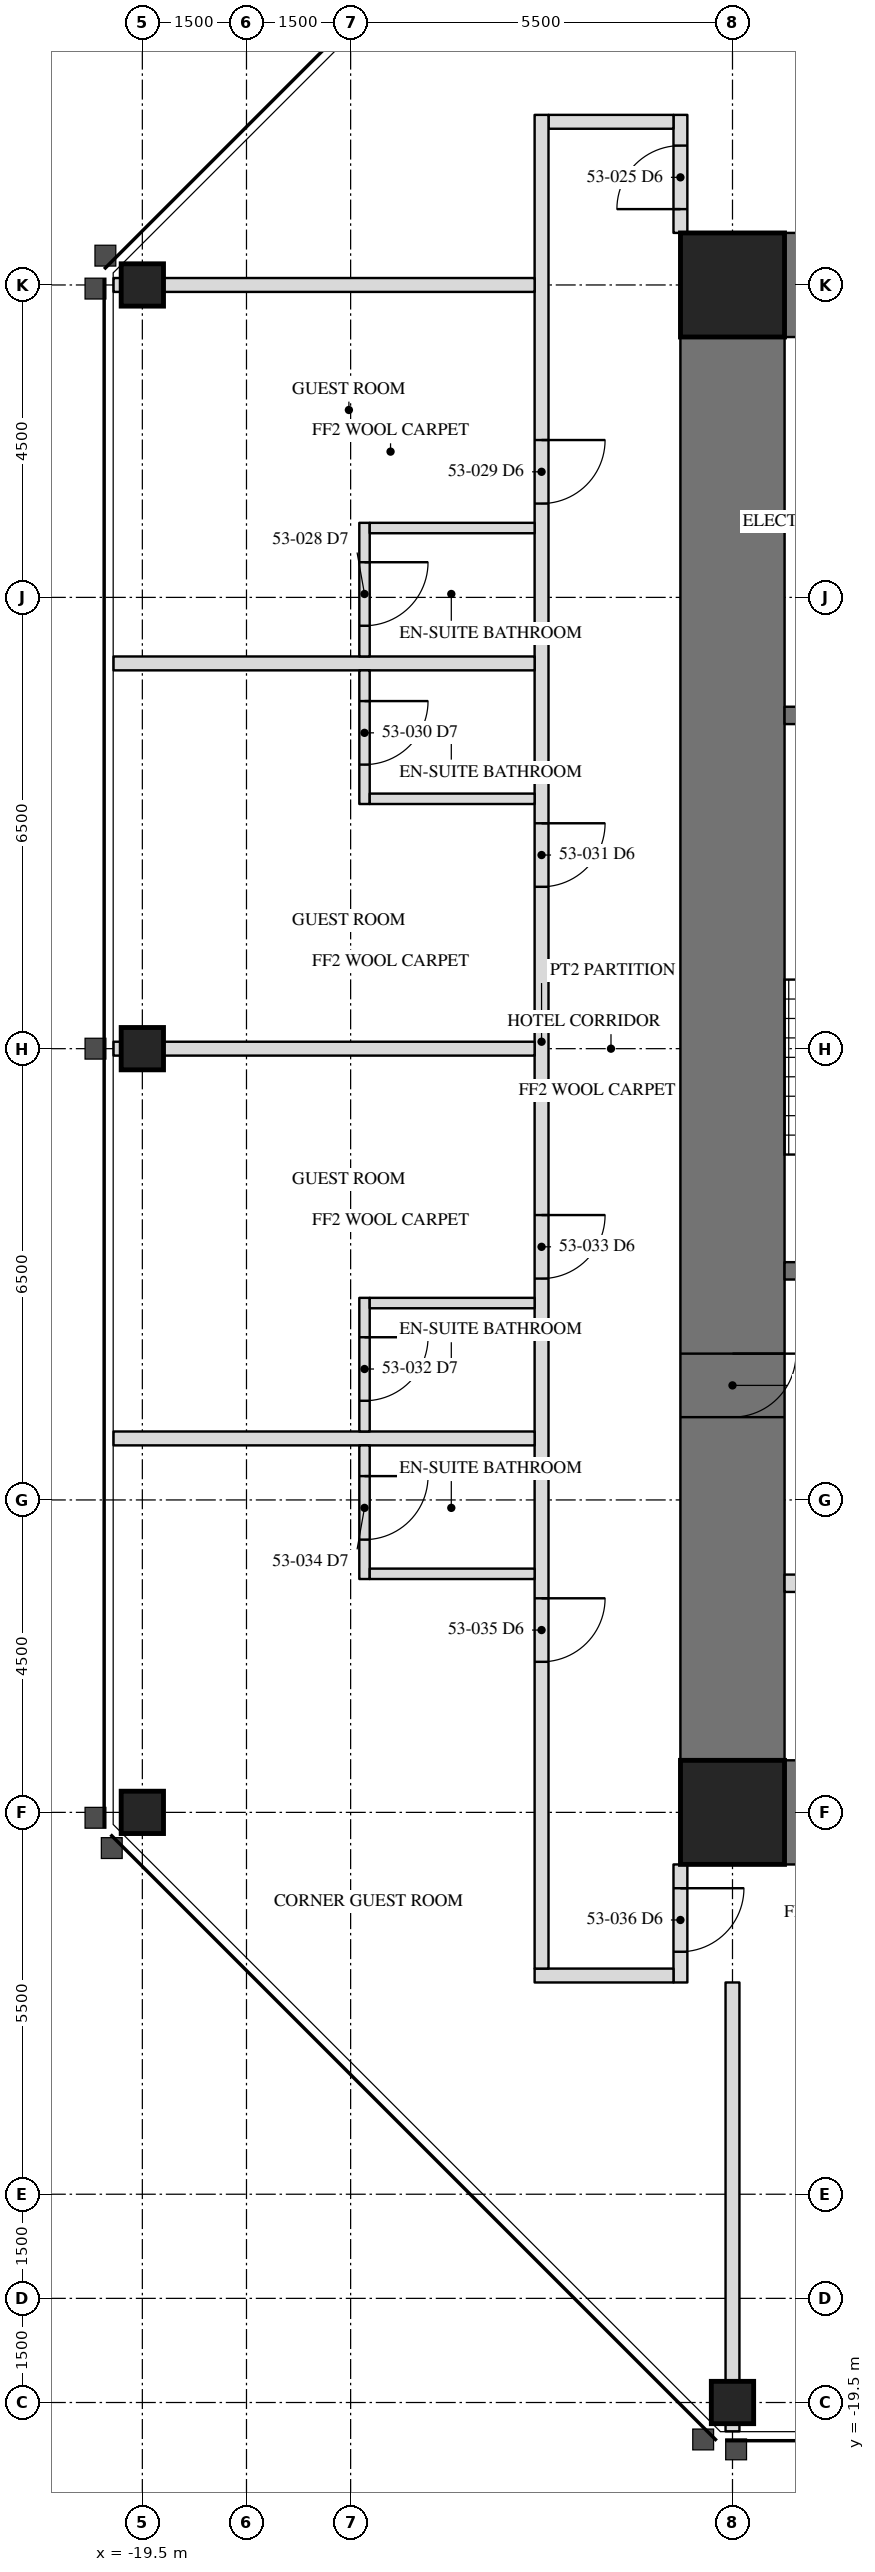
"""IFC4 building model, lengths in metres.
Left out: names, types, materials, properties, quantities, classifications, styles, units other than length and angle.
Written with IfcOpenShell. Run it as: python <this file> out.ifc"""

import sys

from ifc_helpers import new_model, si_unit, direction, frame, frame_2d, origin, origin_2d, place, context, subcontext, project, spatial, rectangle, hollow_rectangle, extrude, element, fill, save


model = new_model("IFC4")
c1 = context("Model", 3, precision=1e-05, world=origin(), true_north=direction((0.0, 1.0)))
c2 = subcontext(c1, "Body", "Model", "MODEL_VIEW")
j1 = project(units=[si_unit("LENGTHUNIT", "METRE"), si_unit("PLANEANGLEUNIT", "RADIAN")], contexts=[c1])
p1 = place(None, origin())
s1 = spatial("IfcSite", under=j1, at=p1, CompositionType="ELEMENT")
p2 = place(p1, origin())
s2 = spatial("IfcBuilding", under=s1, at=p2, CompositionType="ELEMENT")
p3 = place(p2, frame((0.0, 0.0, 222.2)))
s3 = spatial("IfcBuildingStorey", under=s2, at=p3, CompositionType="ELEMENT", Elevation=222.2)
for number, where, z_axis, x_axis in (
    (1, (-19.5, 0.0, 0.0), (0.0, 0.0, 1.0), (0.0, 1.0, 0.0)),
    (2, (-19.5, -11.0, 0.0), (0.0, 0.0, 1.0), (0.0, 1.0, 0.0)),
    (3, (-11.0, -19.5, 0.0), (0.0, 0.0, 1.0), (1.0, 0.0, 0.0)),
    (4, (-19.5, 11.0, 0.0), (0.0, 0.0, 1.0), (0.0, 1.0, 0.0)),
):
    element("IfcColumn", number, at=place(p3, frame(where, z_axis=z_axis, x_axis=x_axis)), inside=s3, PredefinedType="COLUMN", context=c2, shape_type="SweptSolid", body=[
        extrude(hollow_rectangle(XDim=0.61, YDim=0.61, WallThickness=0.076, at=origin_2d()), origin(), (0.0, 0.0, 1.0), 3.5),
    ])
p4 = place(p3, frame((-11.0, 11.0, 0.0), z_axis=(0.0, 0.0, 1.0), x_axis=(0.0, -1.0, 0.0)))
e5 = element("IfcWall", 5, at=p4, inside=s3, PredefinedType="SHEAR", context=c2, shape_type="SweptSolid", body=[
    extrude(rectangle(XDim=22.0, YDim=1.5, at=frame_2d((11.0, 0.0))), origin(), (0.0, 0.0, 1.0), 3.5),
])
p5 = place(p4, frame((15.393, 0.0, 0.0)))
e6 = element("IfcOpeningElement", 6, at=p5, cuts=e5, PredefinedType="OPENING", context=c2, shape_type="SweptSolid", body=[
    extrude(rectangle(XDim=0.915, YDim=2.134, at=frame_2d((0.458, 1.067))), frame((0.0, 0.76, 0.0), z_axis=(0.0, -1.0, 0.0), x_axis=(1.0, 0.0, 0.0)), (0.0, 0.0, 1.0), 1.52),
])
for number, where, z_axis, x_axis in (
    (7, (-6.5, 11.0, 0.0), (0.0, 0.0, 1.0), (-1.0, 0.0, 0.0)),
    (8, (-11.0, -11.0, 0.0), (0.0, 0.0, 1.0), (1.0, 0.0, 0.0)),
):
    element("IfcWall", number, at=place(p3, frame(where, z_axis=z_axis, x_axis=x_axis)), inside=s3, PredefinedType="SHEAR", context=c2, shape_type="SweptSolid", body=[
        extrude(rectangle(XDim=4.5, YDim=1.5, at=frame_2d((2.25, 0.0))), origin(), (0.0, 0.0, 1.0), 3.5),
    ])
for number, where, z_axis, x_axis in (
    (9, (-11.0, 11.0, 0.0), (0.0, 0.0, 1.0), (1.0, 0.0, 0.0)),
    (10, (-11.0, -11.0, 0.0), (0.0, 0.0, 1.0), (1.0, 0.0, 0.0)),
):
    element("IfcColumn", number, at=place(p3, frame(where, z_axis=z_axis, x_axis=x_axis)), inside=s3, PredefinedType="COLUMN", context=c2, shape_type="SweptSolid", body=[
        extrude(hollow_rectangle(XDim=1.499, YDim=1.499, WallThickness=0.102, at=origin_2d()), origin(), (0.0, 0.0, 1.0), 3.5),
    ])
p6 = place(p3, frame((-6.95, 4.8, 0.0), z_axis=(0.0, 0.0, 1.0), x_axis=(-1.0, 0.0, 0.0)))
e11 = element("IfcWall", 11, at=p6, inside=s3, PredefinedType="SOLIDWALL", context=c2, shape_type="SweptSolid", body=[
    extrude(rectangle(XDim=3.3, YDim=0.25, at=frame_2d((1.65, 0.0))), origin(), (0.0, 0.0, 1.0), 3.31),
])
p7 = place(p3, frame((-6.95, -3.2, 0.0), z_axis=(0.0, 0.0, 1.0), x_axis=(-1.0, 0.0, 0.0)))
e12 = element("IfcWall", 12, at=p7, inside=s3, PredefinedType="SOLIDWALL", context=c2, shape_type="SweptSolid", body=[
    extrude(rectangle(XDim=3.3, YDim=0.25, at=frame_2d((1.65, 0.0))), origin(), (0.0, 0.0, 1.0), 3.31),
])
p8 = place(p7, frame((1.116, 0.0, 0.0)))
e13 = element("IfcOpeningElement", 13, at=p8, cuts=e12, PredefinedType="OPENING", context=c2, shape_type="SweptSolid", body=[
    extrude(rectangle(XDim=1.067, YDim=2.134, at=frame_2d((0.533, 1.067))), frame((0.0, 0.135, 0.0), z_axis=(0.0, -1.0, 0.0), x_axis=(1.0, 0.0, 0.0)), (0.0, 0.0, 1.0), 0.27),
])
p9 = place(p3, frame((-6.95, -7.7, 0.0), z_axis=(0.0, 0.0, 1.0), x_axis=(-1.0, 0.0, 0.0)))
e14 = element("IfcWall", 14, at=p9, inside=s3, PredefinedType="PARTITIONING", context=c2, shape_type="SweptSolid", body=[
    extrude(rectangle(XDim=3.3, YDim=0.25, at=frame_2d((1.65, 0.0))), origin(), (0.0, 0.0, 1.0), 3.31),
])
p10 = place(p9, frame((0.45, 0.0, 0.0)))
e15 = element("IfcOpeningElement", 15, at=p10, cuts=e14, PredefinedType="OPENING", context=c2, shape_type="SweptSolid", body=[
    extrude(rectangle(XDim=1.219, YDim=2.134, at=frame_2d((0.609, 1.067))), frame((0.0, 0.135, 0.0), z_axis=(0.0, -1.0, 0.0), x_axis=(1.0, 0.0, 0.0)), (0.0, 0.0, 1.0), 0.27),
])
p11 = place(p3, frame((-11.75, 11.75, 0.0), z_axis=(0.0, 0.0, 1.0), x_axis=(0.0, 1.0, 0.0)))
e16 = element("IfcWall", 16, at=p11, inside=s3, PredefinedType="PARTITIONING", context=c2, shape_type="SweptSolid", body=[
    extrude(rectangle(XDim=1.7, YDim=0.2, at=frame_2d((0.85, 0.0))), origin(), (0.0, 0.0, 1.0), 3.31),
])
p12 = place(p11, frame((0.343, 0.0, 0.0)))
e17 = element("IfcOpeningElement", 17, at=p12, cuts=e16, PredefinedType="OPENING", context=c2, shape_type="SweptSolid", body=[
    extrude(rectangle(XDim=0.915, YDim=2.134, at=frame_2d((0.458, 1.067))), frame((0.0, 0.11, 0.0), z_axis=(0.0, -1.0, 0.0), x_axis=(1.0, 0.0, 0.0)), (0.0, 0.0, 1.0), 0.22),
])
p13 = place(p3, frame((-11.85, 13.35, 0.0), z_axis=(0.0, 0.0, 1.0), x_axis=(-1.0, 0.0, 0.0)))
e18 = element("IfcWall", 18, at=p13, inside=s3, PredefinedType="PARTITIONING", context=c2, shape_type="SweptSolid", body=[
    extrude(rectangle(XDim=1.8, YDim=0.2, at=frame_2d((0.9, 0.0))), origin(), (0.0, 0.0, 1.0), 3.31),
])
p14 = place(p3, frame((-11.75, -11.75, 0.0), z_axis=(0.0, 0.0, 1.0), x_axis=(0.0, -1.0, 0.0)))
e19 = element("IfcWall", 19, at=p14, inside=s3, PredefinedType="PARTITIONING", context=c2, shape_type="SweptSolid", body=[
    extrude(rectangle(XDim=1.7, YDim=0.2, at=frame_2d((0.85, 0.0))), origin(), (0.0, 0.0, 1.0), 3.31),
])
p15 = place(p14, frame((0.343, 0.0, 0.0)))
e20 = element("IfcOpeningElement", 20, at=p15, cuts=e19, PredefinedType="OPENING", context=c2, shape_type="SweptSolid", body=[
    extrude(rectangle(XDim=0.915, YDim=2.134, at=frame_2d((0.458, 1.067))), frame((0.0, 0.11, 0.0), z_axis=(0.0, -1.0, 0.0), x_axis=(1.0, 0.0, 0.0)), (0.0, 0.0, 1.0), 0.22),
])
p16 = place(p3, frame((-13.85, -13.35, 0.0), z_axis=(0.0, 0.0, 1.0), x_axis=(1.0, 0.0, 0.0)))
e21 = element("IfcWall", 21, at=p16, inside=s3, PredefinedType="PARTITIONING", context=c2, shape_type="SweptSolid", body=[
    extrude(rectangle(XDim=2.0, YDim=0.2, at=frame_2d((1.0, 0.0))), origin(), (0.0, 0.0, 1.0), 3.31),
])
p17 = place(p3, frame((-13.75, 13.45, 0.0), z_axis=(0.0, 0.0, 1.0), x_axis=(0.0, -1.0, 0.0)))
e22 = element("IfcWall", 22, at=p17, inside=s3, PredefinedType="PARTITIONING", context=c2, shape_type="SweptSolid", body=[
    extrude(rectangle(XDim=26.7, YDim=0.2, at=frame_2d((13.35, 0.0))), origin(), (0.0, 0.0, 1.0), 3.31),
])
p18 = place(p17, frame((4.684, 0.0, 0.0)))
e23 = element("IfcOpeningElement", 23, at=p18, cuts=e22, PredefinedType="OPENING", context=c2, shape_type="SweptSolid", body=[
    extrude(rectangle(XDim=0.915, YDim=2.134, at=frame_2d((0.458, 1.067))), frame((0.0, 0.11, 0.0), z_axis=(0.0, -1.0, 0.0), x_axis=(1.0, 0.0, 0.0)), (0.0, 0.0, 1.0), 0.22),
])
p19 = place(p17, frame((10.204, 0.0, 0.0)))
e24 = element("IfcOpeningElement", 24, at=p19, cuts=e22, PredefinedType="OPENING", context=c2, shape_type="SweptSolid", body=[
    extrude(rectangle(XDim=0.915, YDim=2.134, at=frame_2d((0.458, 1.067))), frame((0.0, 0.11, 0.0), z_axis=(0.0, -1.0, 0.0), x_axis=(1.0, 0.0, 0.0)), (0.0, 0.0, 1.0), 0.22),
])
p20 = place(p17, frame((15.846, 0.0, 0.0)))
e25 = element("IfcOpeningElement", 25, at=p20, cuts=e22, PredefinedType="OPENING", context=c2, shape_type="SweptSolid", body=[
    extrude(rectangle(XDim=0.915, YDim=2.134, at=frame_2d((0.458, 1.067))), frame((0.0, 0.11, 0.0), z_axis=(0.0, -1.0, 0.0), x_axis=(1.0, 0.0, 0.0)), (0.0, 0.0, 1.0), 0.22),
])
p21 = place(p17, frame((21.366, 0.0, 0.0)))
e26 = element("IfcOpeningElement", 26, at=p21, cuts=e22, PredefinedType="OPENING", context=c2, shape_type="SweptSolid", body=[
    extrude(rectangle(XDim=0.915, YDim=2.134, at=frame_2d((0.458, 1.067))), frame((0.0, 0.11, 0.0), z_axis=(0.0, -1.0, 0.0), x_axis=(1.0, 0.0, 0.0)), (0.0, 0.0, 1.0), 0.22),
])
p22 = place(p3, frame((-13.85, 11.0, 0.0), z_axis=(0.0, 0.0, 1.0), x_axis=(-1.0, 0.0, 0.0)))
e27 = element("IfcWall", 27, at=p22, inside=s3, PredefinedType="PARTITIONING", context=c2, shape_type="SweptSolid", body=[
    extrude(rectangle(XDim=6.065, YDim=0.2, at=frame_2d((3.032, 0.0))), origin(), (0.0, 0.0, 1.0), 2.802),
])
p23 = place(p3, frame((-13.85, 5.549, 0.0), z_axis=(0.0, 0.0, 1.0), x_axis=(-1.0, 0.0, 0.0)))
e28 = element("IfcWall", 28, at=p23, inside=s3, PredefinedType="PARTITIONING", context=c2, shape_type="SweptSolid", body=[
    extrude(rectangle(XDim=6.065, YDim=0.2, at=frame_2d((3.032, 0.0))), origin(), (0.0, 0.0, 1.0), 3.31),
])
p24 = place(p3, frame((-13.85, 0.0, 0.0), z_axis=(0.0, 0.0, 1.0), x_axis=(-1.0, 0.0, 0.0)))
e29 = element("IfcWall", 29, at=p24, inside=s3, PredefinedType="PARTITIONING", context=c2, shape_type="SweptSolid", body=[
    extrude(rectangle(XDim=6.065, YDim=0.2, at=frame_2d((3.032, 0.0))), origin(), (0.0, 0.0, 1.0), 2.802),
])
p25 = place(p3, frame((-13.85, -5.614, 0.0), z_axis=(0.0, 0.0, 1.0), x_axis=(-1.0, 0.0, 0.0)))
e30 = element("IfcWall", 30, at=p25, inside=s3, PredefinedType="PARTITIONING", context=c2, shape_type="SweptSolid", body=[
    extrude(rectangle(XDim=6.065, YDim=0.2, at=frame_2d((3.032, 0.0))), origin(), (0.0, 0.0, 1.0), 3.31),
])
p26 = place(p3, frame((-16.3, 7.574, 0.0), z_axis=(0.0, 0.0, 1.0), x_axis=(0.0, -1.0, 0.0)))
e31 = element("IfcWall", 31, at=p26, inside=s3, PredefinedType="PARTITIONING", context=c2, shape_type="SweptSolid", body=[
    extrude(rectangle(XDim=1.925, YDim=0.15, at=frame_2d((0.962, 0.0))), origin(), (0.0, 0.0, 1.0), 3.31),
])
p27 = place(p26, frame((0.567, 0.0, 0.0)))
e32 = element("IfcOpeningElement", 32, at=p27, cuts=e31, PredefinedType="OPENING", context=c2, shape_type="SweptSolid", body=[
    extrude(rectangle(XDim=0.915, YDim=2.032, at=frame_2d((0.458, 1.016))), frame((0.0, 0.085, 0.0), z_axis=(0.0, -1.0, 0.0), x_axis=(1.0, 0.0, 0.0)), (0.0, 0.0, 1.0), 0.17),
])
p28 = place(p3, frame((-13.85, 7.499, 0.0), z_axis=(0.0, 0.0, 1.0), x_axis=(-1.0, 0.0, 0.0)))
e33 = element("IfcWall", 33, at=p28, inside=s3, PredefinedType="PARTITIONING", context=c2, shape_type="SweptSolid", body=[
    extrude(rectangle(XDim=2.375, YDim=0.15, at=frame_2d((1.188, 0.0))), origin(), (0.0, 0.0, 1.0), 3.31),
])
p29 = place(p3, frame((-16.3, 5.449, 0.0), z_axis=(0.0, 0.0, 1.0), x_axis=(0.0, -1.0, 0.0)))
e34 = element("IfcWall", 34, at=p29, inside=s3, PredefinedType="PARTITIONING", context=c2, shape_type="SweptSolid", body=[
    extrude(rectangle(XDim=1.925, YDim=0.15, at=frame_2d((0.962, 0.0))), origin(), (0.0, 0.0, 1.0), 3.31),
])
p30 = place(p29, frame((0.442, 0.0, 0.0)))
e35 = element("IfcOpeningElement", 35, at=p30, cuts=e34, PredefinedType="OPENING", context=c2, shape_type="SweptSolid", body=[
    extrude(rectangle(XDim=0.915, YDim=2.032, at=frame_2d((0.458, 1.016))), frame((0.0, 0.085, 0.0), z_axis=(0.0, -1.0, 0.0), x_axis=(1.0, 0.0, 0.0)), (0.0, 0.0, 1.0), 0.17),
])
p31 = place(p3, frame((-13.85, 3.599, 0.0), z_axis=(0.0, 0.0, 1.0), x_axis=(-1.0, 0.0, 0.0)))
e36 = element("IfcWall", 36, at=p31, inside=s3, PredefinedType="PARTITIONING", context=c2, shape_type="SweptSolid", body=[
    extrude(rectangle(XDim=2.375, YDim=0.15, at=frame_2d((1.188, 0.0))), origin(), (0.0, 0.0, 1.0), 2.703),
])
p32 = place(p3, frame((-16.3, -3.589, 0.0), z_axis=(0.0, 0.0, 1.0), x_axis=(0.0, -1.0, 0.0)))
e37 = element("IfcWall", 37, at=p32, inside=s3, PredefinedType="PARTITIONING", context=c2, shape_type="SweptSolid", body=[
    extrude(rectangle(XDim=1.925, YDim=0.15, at=frame_2d((0.962, 0.0))), origin(), (0.0, 0.0, 1.0), 3.31),
])
p33 = place(p32, frame((0.567, 0.0, 0.0)))
e38 = element("IfcOpeningElement", 38, at=p33, cuts=e37, PredefinedType="OPENING", context=c2, shape_type="SweptSolid", body=[
    extrude(rectangle(XDim=0.915, YDim=2.032, at=frame_2d((0.458, 1.016))), frame((0.0, 0.085, 0.0), z_axis=(0.0, -1.0, 0.0), x_axis=(1.0, 0.0, 0.0)), (0.0, 0.0, 1.0), 0.17),
])
p34 = place(p3, frame((-13.85, -3.664, 0.0), z_axis=(0.0, 0.0, 1.0), x_axis=(-1.0, 0.0, 0.0)))
e39 = element("IfcWall", 39, at=p34, inside=s3, PredefinedType="PARTITIONING", context=c2, shape_type="SweptSolid", body=[
    extrude(rectangle(XDim=2.375, YDim=0.15, at=frame_2d((1.188, 0.0))), origin(), (0.0, 0.0, 1.0), 2.703),
])
p35 = place(p3, frame((-16.3, -5.714, 0.0), z_axis=(0.0, 0.0, 1.0), x_axis=(0.0, -1.0, 0.0)))
e40 = element("IfcWall", 40, at=p35, inside=s3, PredefinedType="PARTITIONING", context=c2, shape_type="SweptSolid", body=[
    extrude(rectangle(XDim=1.925, YDim=0.15, at=frame_2d((0.962, 0.0))), origin(), (0.0, 0.0, 1.0), 3.31),
])
p36 = place(p35, frame((0.442, 0.0, 0.0)))
e41 = element("IfcOpeningElement", 41, at=p36, cuts=e40, PredefinedType="OPENING", context=c2, shape_type="SweptSolid", body=[
    extrude(rectangle(XDim=0.915, YDim=2.032, at=frame_2d((0.458, 1.016))), frame((0.0, 0.085, 0.0), z_axis=(0.0, -1.0, 0.0), x_axis=(1.0, 0.0, 0.0)), (0.0, 0.0, 1.0), 0.17),
])
p37 = place(p3, frame((-13.85, -7.564, 0.0), z_axis=(0.0, 0.0, 1.0), x_axis=(-1.0, 0.0, 0.0)))
e42 = element("IfcWall", 42, at=p37, inside=s3, PredefinedType="PARTITIONING", context=c2, shape_type="SweptSolid", body=[
    extrude(rectangle(XDim=2.375, YDim=0.15, at=frame_2d((1.188, 0.0))), origin(), (0.0, 0.0, 1.0), 3.31),
])
p38 = place(p3, frame((-11.0, -13.45, 0.0), z_axis=(0.0, 0.0, 1.0), x_axis=(0.0, -1.0, 0.0)))
e43 = element("IfcWall", 43, at=p38, inside=s3, PredefinedType="PARTITIONING", context=c2, shape_type="SweptSolid", body=[
    extrude(rectangle(XDim=6.465, YDim=0.2, at=frame_2d((3.232, 0.0))), origin(), (0.0, 0.0, 1.0), 2.802),
])
p39 = place(p5, origin())
e44 = element("IfcDoor", 44, at=p39, inside=s3, OperationType="SINGLE_SWING_RIGHT", PredefinedType="DOOR", context=c2, shape_type="SweptSolid", body=[
    extrude(rectangle(XDim=0.915, YDim=2.134, at=frame_2d((0.458, 1.067))), frame((0.0, -0.675, 0.0), z_axis=(0.0, -1.0, 0.0), x_axis=(1.0, 0.0, 0.0)), (0.0, 0.0, 1.0), 0.05),
])
fill(e6, e44)
p40 = place(p12, origin())
e45 = element("IfcDoor", 45, at=p40, inside=s3, OperationType="SINGLE_SWING_LEFT", PredefinedType="DOOR", context=c2, shape_type="SweptSolid", body=[
    extrude(rectangle(XDim=0.915, YDim=2.134, at=frame_2d((0.458, 1.067))), frame((0.0, 0.025, 0.0), z_axis=(0.0, -1.0, 0.0), x_axis=(1.0, 0.0, 0.0)), (0.0, 0.0, 1.0), 0.05),
])
fill(e17, e45)
p41 = place(p27, origin())
e46 = element("IfcDoor", 46, at=p41, inside=s3, OperationType="SINGLE_SWING_LEFT", PredefinedType="DOOR", context=c2, shape_type="SweptSolid", body=[
    extrude(rectangle(XDim=0.915, YDim=2.032, at=frame_2d((0.458, 1.016))), frame((0.0, 0.025, 0.0), z_axis=(0.0, -1.0, 0.0), x_axis=(1.0, 0.0, 0.0)), (0.0, 0.0, 1.0), 0.05),
])
fill(e32, e46)
p42 = place(p18, origin())
e47 = element("IfcDoor", 47, at=p42, inside=s3, OperationType="SINGLE_SWING_LEFT", PredefinedType="DOOR", context=c2, shape_type="SweptSolid", body=[
    extrude(rectangle(XDim=0.915, YDim=2.134, at=frame_2d((0.458, 1.067))), frame((0.0, 0.025, 0.0), z_axis=(0.0, -1.0, 0.0), x_axis=(1.0, 0.0, 0.0)), (0.0, 0.0, 1.0), 0.05),
])
fill(e23, e47)
p43 = place(p30, origin())
e48 = element("IfcDoor", 48, at=p43, inside=s3, OperationType="SINGLE_SWING_LEFT", PredefinedType="DOOR", context=c2, shape_type="SweptSolid", body=[
    extrude(rectangle(XDim=0.915, YDim=2.032, at=frame_2d((0.458, 1.016))), frame((0.0, 0.025, 0.0), z_axis=(0.0, -1.0, 0.0), x_axis=(1.0, 0.0, 0.0)), (0.0, 0.0, 1.0), 0.05),
])
fill(e35, e48)
p44 = place(p19, origin())
e49 = element("IfcDoor", 49, at=p44, inside=s3, OperationType="SINGLE_SWING_LEFT", PredefinedType="DOOR", context=c2, shape_type="SweptSolid", body=[
    extrude(rectangle(XDim=0.915, YDim=2.134, at=frame_2d((0.458, 1.067))), frame((0.0, 0.025, 0.0), z_axis=(0.0, -1.0, 0.0), x_axis=(1.0, 0.0, 0.0)), (0.0, 0.0, 1.0), 0.05),
])
fill(e24, e49)
p45 = place(p33, origin())
e50 = element("IfcDoor", 50, at=p45, inside=s3, OperationType="SINGLE_SWING_LEFT", PredefinedType="DOOR", context=c2, shape_type="SweptSolid", body=[
    extrude(rectangle(XDim=0.915, YDim=2.032, at=frame_2d((0.458, 1.016))), frame((0.0, 0.025, 0.0), z_axis=(0.0, -1.0, 0.0), x_axis=(1.0, 0.0, 0.0)), (0.0, 0.0, 1.0), 0.05),
])
fill(e38, e50)
p46 = place(p20, origin())
e51 = element("IfcDoor", 51, at=p46, inside=s3, OperationType="SINGLE_SWING_LEFT", PredefinedType="DOOR", context=c2, shape_type="SweptSolid", body=[
    extrude(rectangle(XDim=0.915, YDim=2.134, at=frame_2d((0.458, 1.067))), frame((0.0, 0.025, 0.0), z_axis=(0.0, -1.0, 0.0), x_axis=(1.0, 0.0, 0.0)), (0.0, 0.0, 1.0), 0.05),
])
fill(e25, e51)
p47 = place(p36, origin())
e52 = element("IfcDoor", 52, at=p47, inside=s3, OperationType="SINGLE_SWING_LEFT", PredefinedType="DOOR", context=c2, shape_type="SweptSolid", body=[
    extrude(rectangle(XDim=0.915, YDim=2.032, at=frame_2d((0.458, 1.016))), frame((0.0, 0.025, 0.0), z_axis=(0.0, -1.0, 0.0), x_axis=(1.0, 0.0, 0.0)), (0.0, 0.0, 1.0), 0.05),
])
fill(e41, e52)
p48 = place(p21, origin())
e53 = element("IfcDoor", 53, at=p48, inside=s3, OperationType="SINGLE_SWING_LEFT", PredefinedType="DOOR", context=c2, shape_type="SweptSolid", body=[
    extrude(rectangle(XDim=0.915, YDim=2.134, at=frame_2d((0.458, 1.067))), frame((0.0, 0.025, 0.0), z_axis=(0.0, -1.0, 0.0), x_axis=(1.0, 0.0, 0.0)), (0.0, 0.0, 1.0), 0.05),
])
fill(e26, e53)
p49 = place(p15, origin())
e54 = element("IfcDoor", 54, at=p49, inside=s3, OperationType="SINGLE_SWING_LEFT", PredefinedType="DOOR", context=c2, shape_type="SweptSolid", body=[
    extrude(rectangle(XDim=0.915, YDim=2.134, at=frame_2d((0.458, 1.067))), frame((0.0, 0.025, 0.0), z_axis=(0.0, -1.0, 0.0), x_axis=(1.0, 0.0, 0.0)), (0.0, 0.0, 1.0), 0.05),
])
fill(e20, e54)
save(model, sys.argv[1])
